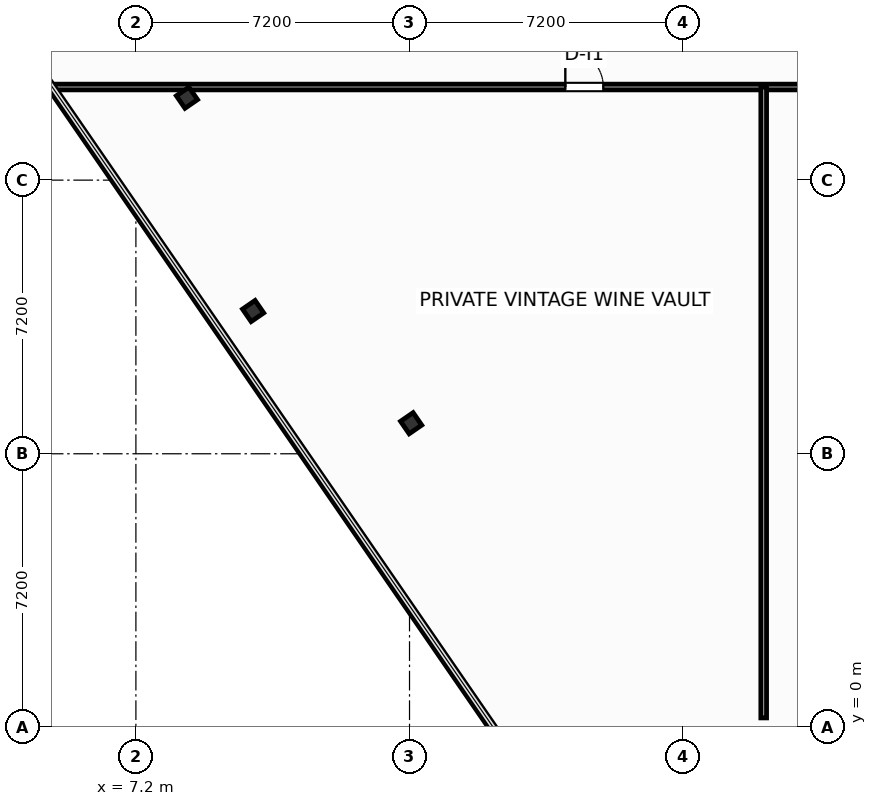
"""IFC4 building model, lengths in metres.
Left out: names, types, materials, properties, quantities, classifications, styles, units other than length and angle.
Written with IfcOpenShell. Run it as: python <this file> out.ifc"""

import sys

from ifc_helpers import new_model, si_unit, direction, frame, frame_2d, origin, origin_2d, place, context, subcontext, project, spatial, rectangle, i_section, extrude, element, fill, save


model = new_model("IFC4")
c1 = context("Model", 3, precision=1e-05, world=origin(), true_north=direction((0.0, 1.0)))
c2 = subcontext(c1, "Body", "Model", "MODEL_VIEW")
j1 = project(units=[si_unit("LENGTHUNIT", "METRE"), si_unit("PLANEANGLEUNIT", "RADIAN")], contexts=[c1])
p1 = place(None, origin())
s1 = spatial("IfcSite", under=j1, at=p1, CompositionType="ELEMENT")
p2 = place(p1, origin())
s2 = spatial("IfcBuilding", under=s1, at=p2, CompositionType="ELEMENT")
p3 = place(p2, frame((0.0, 0.0, 291.5)))
s3 = spatial("IfcBuildingStorey", under=s2, at=p3, CompositionType="ELEMENT", Elevation=291.5)
for number, where, z_axis, x_axis in (
    (1, (8.543, 16.569, 0.0), (0.0, 0.0, 1.0), (0.824, 0.567, 0.0)),
    (2, (10.284, 10.956, 0.0), (0.0, 0.0, 1.0), (0.824, 0.567, 0.0)),
    (3, (14.443, 8.004, 0.0), (0.0, 0.0, 1.0), (0.824, 0.567, 0.0)),
):
    element("IfcColumn", number, at=place(p3, frame(where, z_axis=z_axis, x_axis=x_axis)), inside=s3, PredefinedType="COLUMN", context=c2, shape_type="SweptSolid", body=[
        extrude(i_section(OverallWidth=0.401, OverallDepth=0.399, WebThickness=0.025, FlangeThickness=0.04, FilletRadius=0.022, at=origin_2d()), origin(), (0.0, 0.0, 1.0), 4.8),
    ])
p4 = place(p3, frame((5.038, 16.85, 0.0), z_axis=(0.0, 0.0, 1.0), x_axis=(1.0, 0.0, 0.0)))
e4 = element("IfcWall", 4, at=p4, inside=s3, PredefinedType="PARTITIONING", context=c2, shape_type="SweptSolid", body=[
    extrude(rectangle(XDim=48.854, YDim=0.15, at=frame_2d((24.427, 0.0))), origin(), (0.0, 0.0, 1.0), 2.265),
])
p5 = place(p4, frame((13.462, 0.0, 0.0)))
e5 = element("IfcOpeningElement", 5, at=p5, cuts=e4, PredefinedType="OPENING", context=c2, shape_type="SweptSolid", body=[
    extrude(rectangle(XDim=1.0, YDim=2.05, at=frame_2d((0.5, 1.025))), frame((0.0, 0.085, 0.0), z_axis=(0.0, -1.0, 0.0), x_axis=(1.0, 0.0, 0.0)), (0.0, 0.0, 1.0), 0.17),
])
p6 = place(p4, frame((24.962, 0.0, 0.0)))
e6 = element("IfcOpeningElement", 6, at=p6, cuts=e4, PredefinedType="OPENING", context=c2, shape_type="SweptSolid", body=[
    extrude(rectangle(XDim=2.0, YDim=2.05, at=frame_2d((1.0, 1.025))), frame((0.0, 0.085, 0.0), z_axis=(0.0, -1.0, 0.0), x_axis=(1.0, 0.0, 0.0)), (0.0, 0.0, 1.0), 0.17),
])
p7 = place(p4, frame((37.962, 0.0, 0.0)))
e7 = element("IfcOpeningElement", 7, at=p7, cuts=e4, PredefinedType="OPENING", context=c2, shape_type="SweptSolid", body=[
    extrude(rectangle(XDim=1.6, YDim=2.05, at=frame_2d((0.8, 1.025))), frame((0.0, 0.085, 0.0), z_axis=(0.0, -1.0, 0.0), x_axis=(1.0, 0.0, 0.0)), (0.0, 0.0, 1.0), 0.17),
])
p8 = place(p3, frame((23.72, 0.25, 0.0), z_axis=(0.0, 0.0, 1.0), x_axis=(0.0, 1.0, 0.0)))
e8 = element("IfcWall", 8, at=p8, inside=s3, PredefinedType="PARTITIONING", context=c2, shape_type="SweptSolid", body=[
    extrude(rectangle(XDim=16.6, YDim=0.15, at=frame_2d((8.3, 0.0))), origin(), (0.0, 0.0, 1.0), 4.48),
])
p9 = place(p5, origin())
e9 = element("IfcDoor", 9, at=p9, inside=s3, OperationType="SINGLE_SWING_LEFT", PredefinedType="DOOR", context=c2, shape_type="SweptSolid", body=[
    extrude(rectangle(XDim=1.0, YDim=2.05, at=frame_2d((0.5, 1.025))), frame((0.0, 0.025, 0.0), z_axis=(0.0, -1.0, 0.0), x_axis=(1.0, 0.0, 0.0)), (0.0, 0.0, 1.0), 0.05),
])
fill(e5, e9)
save(model, sys.argv[1])
